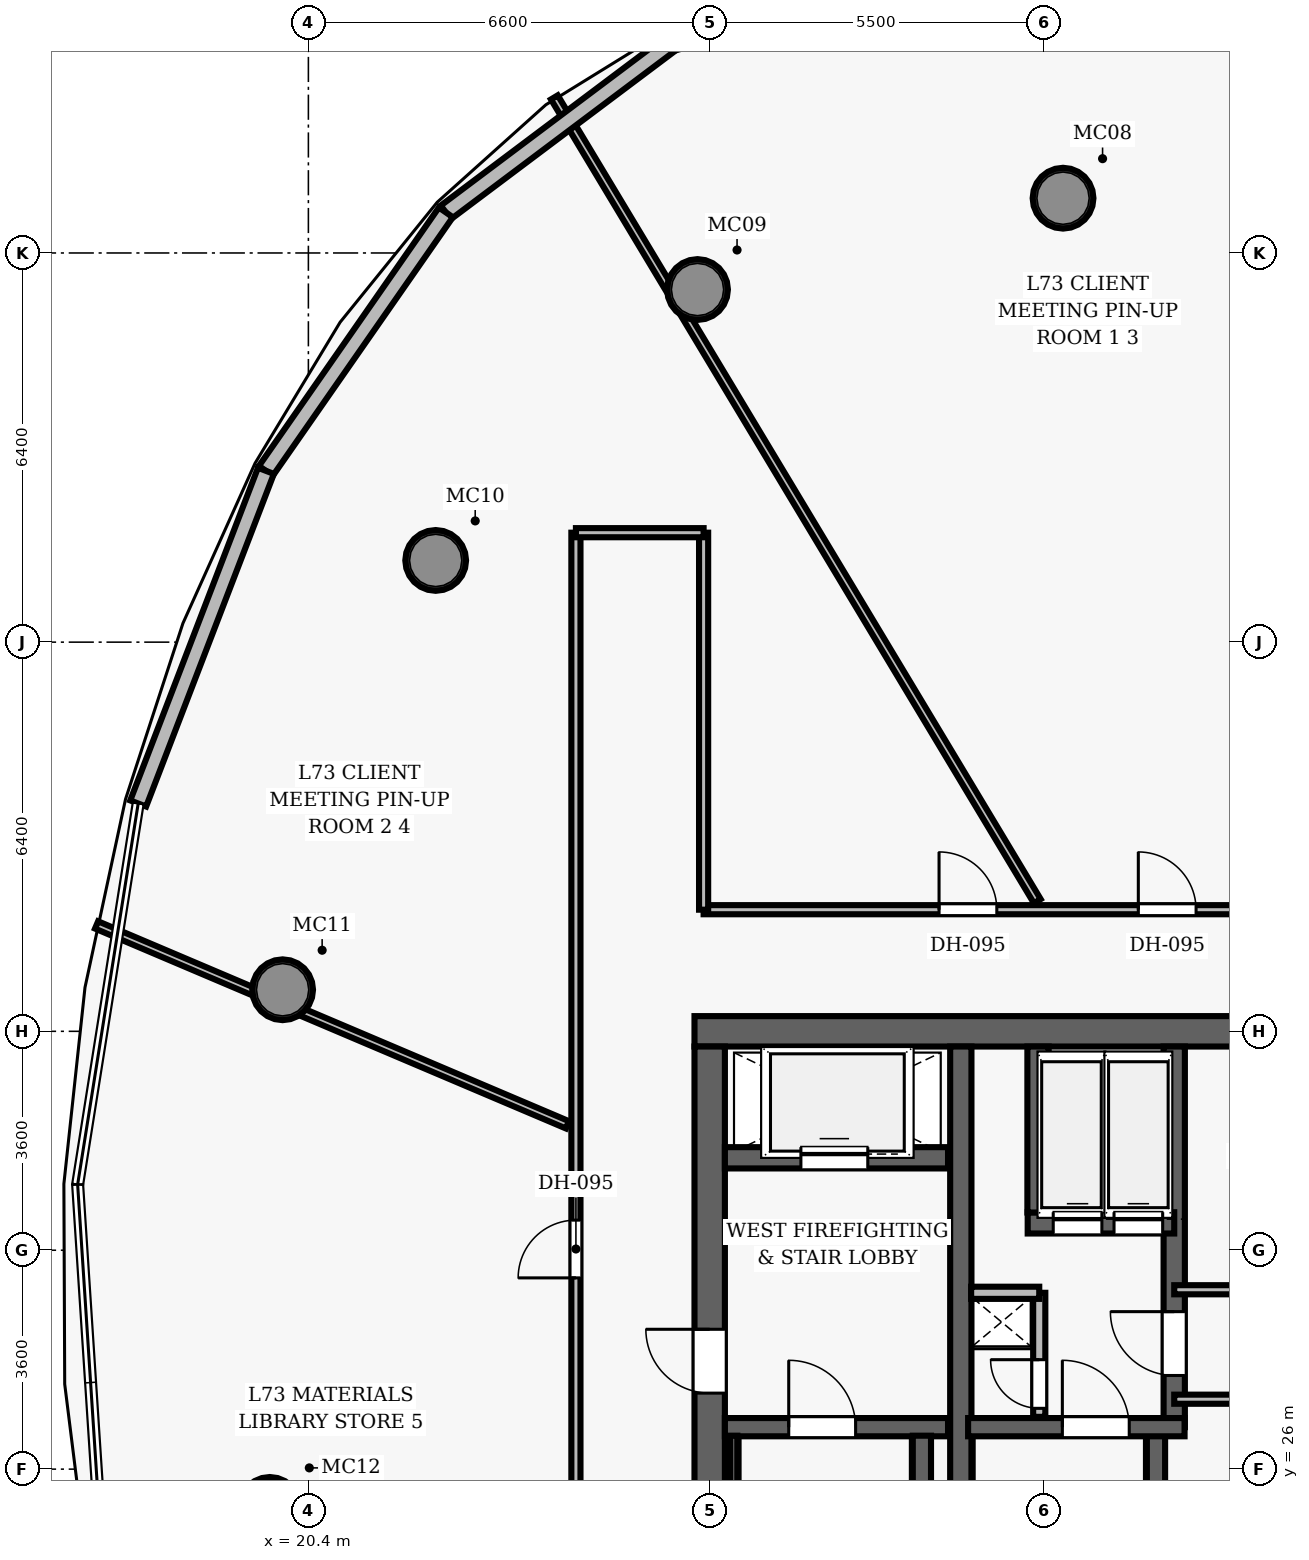
"""IFC4 building model, lengths in metres.
Left out: names, types, materials, properties, quantities, classifications, styles, units other than length and angle.
Written with IfcOpenShell. Run it as: python <this file> out.ifc"""

import sys

from ifc_helpers import new_model, si_unit, direction, frame, frame_2d, origin, origin_2d, place, context, subcontext, project, spatial, rectangle, hollow_circle, extrude, element, fill, save


model = new_model("IFC4")
c1 = context("Model", 3, precision=1e-05, world=origin(), true_north=direction((0.0, 1.0)))
c2 = subcontext(c1, "Body", "Model", "MODEL_VIEW")
j1 = project(units=[si_unit("LENGTHUNIT", "METRE"), si_unit("PLANEANGLEUNIT", "RADIAN")], contexts=[c1])
p1 = place(None, origin())
s1 = spatial("IfcSite", under=j1, at=p1, CompositionType="ELEMENT")
p2 = place(p1, origin())
s2 = spatial("IfcBuilding", under=s1, at=p2, CompositionType="ELEMENT")
p3 = place(p2, frame((0.0, 0.0, 288.25)))
s3 = spatial("IfcBuildingStorey", under=s2, at=p3, CompositionType="ELEMENT", Elevation=288.25)
p4 = place(p3, frame((26.75, 33.2, 0.0), z_axis=(0.0, 0.0, 1.0), x_axis=(1.0, 0.0, 0.0)))
e1 = element("IfcWall", 1, at=p4, inside=s3, PredefinedType="SHEAR", context=c2, shape_type="SweptSolid", body=[
    extrude(rectangle(XDim=22.5, YDim=0.5, at=frame_2d((11.25, 0.0))), origin(), (0.0, 0.0, 1.0), 3.85),
])
p5 = place(p3, frame((27.0, 19.05, 0.0), z_axis=(0.0, 0.0, 1.0), x_axis=(0.0, 1.0, 0.0)))
e2 = element("IfcWall", 2, at=p5, inside=s3, PredefinedType="SHEAR", context=c2, shape_type="SweptSolid", body=[
    extrude(rectangle(XDim=13.9, YDim=0.5, at=frame_2d((6.95, 0.0))), origin(), (0.0, 0.0, 1.0), 3.85),
])
p6 = place(p5, frame((8.2, 0.0, 0.0)))
e3 = element("IfcOpeningElement", 3, at=p6, cuts=e2, PredefinedType="OPENING", context=c2, shape_type="SweptSolid", body=[
    extrude(rectangle(XDim=1.05, YDim=2.15, at=frame_2d((0.525, 1.075))), frame((0.0, 0.26, 0.0), z_axis=(0.0, -1.0, 0.0), x_axis=(1.0, 0.0, 0.0)), (0.0, 0.0, 1.0), 0.52),
])
p7 = place(p3, frame((31.13, 19.05, 0.0), z_axis=(0.0, 0.0, 1.0), x_axis=(0.0, 1.0, 0.0)))
e4 = element("IfcWall", 4, at=p7, inside=s3, PredefinedType="SHEAR", context=c2, shape_type="SweptSolid", body=[
    extrude(rectangle(XDim=13.9, YDim=0.35, at=frame_2d((6.95, 0.0))), origin(), (0.0, 0.0, 1.0), 3.85),
])
for number, where, z_axis, x_axis in (
    (5, (32.812, 46.901, 0.0), (0.0, 0.0, 1.0), (1.0, 0.0, 0.0)),
    (6, (26.8, 45.399, 0.0), (0.0, 0.0, 1.0), (1.0, 0.0, 0.0)),
    (7, (22.494, 40.944, 0.0), (0.0, 0.0, 1.0), (1.0, 0.0, 0.0)),
    (8, (19.976, 33.884, 0.0), (0.0, 0.0, 1.0), (1.0, 0.0, 0.0)),
    (9, (19.765, 25.371, 0.0), (0.0, 0.0, 1.0), (1.0, 0.0, 0.0)),
):
    element("IfcColumn", number, at=place(p3, frame(where, z_axis=z_axis, x_axis=x_axis)), inside=s3, PredefinedType="COLUMN", context=c2, shape_type="SweptSolid", body=[
        extrude(hollow_circle(Radius=0.5, WallThickness=0.045, at=origin_2d()), origin(), (0.0, 0.0, 1.0), 3.85),
    ])
p8 = place(p3, frame((27.25, 26.69, 0.0), z_axis=(0.0, 0.0, 1.0), x_axis=(1.0, 0.0, 0.0)))
e10 = element("IfcWall", 10, at=p8, inside=s3, PredefinedType="SHEAR", context=c2, shape_type="SweptSolid", body=[
    extrude(rectangle(XDim=3.67, YDim=0.3, at=frame_2d((1.835, 0.0))), origin(), (0.0, 0.0, 1.0), 3.85),
])
p9 = place(p8, frame((1.05, 0.0, 0.0)))
e11 = element("IfcOpeningElement", 11, at=p9, cuts=e10, PredefinedType="OPENING", context=c2, shape_type="SweptSolid", body=[
    extrude(rectangle(XDim=1.1, YDim=2.15, at=frame_2d((0.55, 1.075))), frame((0.0, 0.16, 0.0), z_axis=(0.0, -1.0, 0.0), x_axis=(1.0, 0.0, 0.0)), (0.0, 0.0, 1.0), 0.32),
])
p10 = place(p3, frame((30.49, 19.05, 0.0), z_axis=(0.0, 0.0, 1.0), x_axis=(0.0, 1.0, 0.0)))
e12 = element("IfcWall", 12, at=p10, inside=s3, PredefinedType="SHEAR", context=c2, shape_type="SweptSolid", body=[
    extrude(rectangle(XDim=7.5, YDim=0.3, at=frame_2d((3.75, 0.0))), origin(), (0.0, 0.0, 1.0), 3.85),
])
p11 = place(p3, frame((27.395, 19.1, 0.0), z_axis=(0.0, 0.0, 1.0), x_axis=(0.0, 1.0, 0.0)))
e13 = element("IfcWall", 13, at=p11, inside=s3, PredefinedType="SHEAR", context=c2, shape_type="SweptSolid", body=[
    extrude(rectangle(XDim=7.45, YDim=0.12, at=frame_2d((3.725, 0.0))), origin(), (0.0, 0.0, 1.0), 3.85),
])
p12 = place(p3, frame((27.25, 31.12, 0.0), z_axis=(0.0, 0.0, 1.0), x_axis=(1.0, 0.0, 0.0)))
e14 = element("IfcWall", 14, at=p12, inside=s3, PredefinedType="SHEAR", context=c2, shape_type="SweptSolid", body=[
    extrude(rectangle(XDim=3.67, YDim=0.35, at=frame_2d((1.835, 0.0))), origin(), (0.0, 0.0, 1.0), 3.04),
])
p13 = place(p12, frame((1.25, 0.0, 0.0)))
e15 = element("IfcOpeningElement", 15, at=p13, cuts=e14, PredefinedType="OPENING", context=c2, shape_type="SweptSolid", body=[
    extrude(rectangle(XDim=1.1, YDim=2.15, at=frame_2d((0.55, 1.075))), frame((0.0, 0.185, 0.0), z_axis=(0.0, -1.0, 0.0), x_axis=(1.0, 0.0, 0.0)), (0.0, 0.0, 1.0), 0.37),
])
p14 = place(p3, frame((34.34, 19.05, 0.0), z_axis=(0.0, 0.0, 1.0), x_axis=(0.0, 1.0, 0.0)))
e16 = element("IfcWall", 16, at=p14, inside=s3, PredefinedType="SHEAR", context=c2, shape_type="SweptSolid", body=[
    extrude(rectangle(XDim=7.5, YDim=0.3, at=frame_2d((3.75, 0.0))), origin(), (0.0, 0.0, 1.0), 3.85),
])
p15 = place(p3, frame((34.64, 26.69, 0.0), z_axis=(0.0, 0.0, 1.0), x_axis=(0.0, 1.0, 0.0)))
e17 = element("IfcWall", 17, at=p15, inside=s3, PredefinedType="SHEAR", context=c2, shape_type="SweptSolid", body=[
    extrude(rectangle(XDim=6.26, YDim=0.35, at=frame_2d((3.13, 0.0))), origin(), (0.0, 0.0, 1.0), 3.85),
])
p16 = place(p15, frame((0.85, 0.0, 0.0)))
e18 = element("IfcOpeningElement", 18, at=p16, cuts=e17, PredefinedType="OPENING", context=c2, shape_type="SweptSolid", body=[
    extrude(rectangle(XDim=1.05, YDim=2.15, at=frame_2d((0.525, 1.075))), frame((0.0, 0.185, 0.0), z_axis=(0.0, -1.0, 0.0), x_axis=(1.0, 0.0, 0.0)), (0.0, 0.0, 1.0), 0.37),
])
p17 = place(p3, frame((31.25, 26.69, 0.0), z_axis=(0.0, 0.0, 1.0), x_axis=(1.0, 0.0, 0.0)))
e19 = element("IfcWall", 19, at=p17, inside=s3, PredefinedType="SHEAR", context=c2, shape_type="SweptSolid", body=[
    extrude(rectangle(XDim=3.56, YDim=0.3, at=frame_2d((1.78, 0.0))), origin(), (0.0, 0.0, 1.0), 3.85),
])
p18 = place(p17, frame((1.55, 0.0, 0.0)))
e20 = element("IfcOpeningElement", 20, at=p18, cuts=e19, PredefinedType="OPENING", context=c2, shape_type="SweptSolid", body=[
    extrude(rectangle(XDim=1.1, YDim=2.15, at=frame_2d((0.55, 1.075))), frame((0.0, 0.16, 0.0), z_axis=(0.0, -1.0, 0.0), x_axis=(1.0, 0.0, 0.0)), (0.0, 0.0, 1.0), 0.32),
])
p19 = place(p3, frame((32.23, 30.05, 0.0), z_axis=(0.0, 0.0, 1.0), x_axis=(1.0, 0.0, 0.0)))
e21 = element("IfcWall", 21, at=p19, inside=s3, PredefinedType="SHEAR", context=c2, shape_type="SweptSolid", body=[
    extrude(rectangle(XDim=2.41, YDim=0.35, at=frame_2d((1.205, 0.0))), origin(), (0.0, 0.0, 1.0), 3.04),
])
p20 = place(p19, frame((0.42, 0.0, 0.0)))
e22 = element("IfcOpeningElement", 22, at=p20, cuts=e21, PredefinedType="OPENING", context=c2, shape_type="SweptSolid", body=[
    extrude(rectangle(XDim=0.8, YDim=2.15, at=frame_2d((0.4, 1.075))), frame((0.0, 0.185, 0.0), z_axis=(0.0, -1.0, 0.0), x_axis=(1.0, 0.0, 0.0)), (0.0, 0.0, 1.0), 0.37),
])
p21 = place(p19, frame((1.42, 0.0, 0.0)))
e23 = element("IfcOpeningElement", 23, at=p21, cuts=e21, PredefinedType="OPENING", context=c2, shape_type="SweptSolid", body=[
    extrude(rectangle(XDim=0.8, YDim=2.15, at=frame_2d((0.4, 1.075))), frame((0.0, 0.185, 0.0), z_axis=(0.0, -1.0, 0.0), x_axis=(1.0, 0.0, 0.0)), (0.0, 0.0, 1.0), 0.37),
])
p22 = place(p3, frame((32.4, 30.22, 0.0), z_axis=(0.0, 0.0, 1.0), x_axis=(0.0, 1.0, 0.0)))
e24 = element("IfcWall", 24, at=p22, inside=s3, PredefinedType="SHEAR", context=c2, shape_type="SweptSolid", body=[
    extrude(rectangle(XDim=2.73, YDim=0.35, at=frame_2d((1.365, 0.0))), origin(), (0.0, 0.0, 1.0), 3.04),
])
p23 = place(p3, frame((32.42, 26.86, 0.0), z_axis=(0.0, 0.0, 1.0), x_axis=(0.0, 1.0, 0.0)))
e25 = element("IfcWall", 25, at=p23, inside=s3, PredefinedType="PARTITIONING", context=c2, shape_type="SweptSolid", body=[
    extrude(rectangle(XDim=2.04, YDim=0.2, at=frame_2d((1.02, 0.0))), origin(), (0.0, 0.0, 1.0), 3.04),
])
p24 = place(p23, frame((0.14, 0.0, 0.0)))
e26 = element("IfcOpeningElement", 26, at=p24, cuts=e25, PredefinedType="OPENING", context=c2, shape_type="SweptSolid", body=[
    extrude(rectangle(XDim=0.8, YDim=2.05, at=frame_2d((0.4, 1.025))), frame((0.0, 0.11, 0.0), z_axis=(0.0, -1.0, 0.0), x_axis=(1.0, 0.0, 0.0)), (0.0, 0.0, 1.0), 0.22),
])
p25 = place(p3, frame((31.3, 28.9, 0.0), z_axis=(0.0, 0.0, 1.0), x_axis=(1.0, 0.0, 0.0)))
e27 = element("IfcWall", 27, at=p25, inside=s3, PredefinedType="PARTITIONING", context=c2, shape_type="SweptSolid", body=[
    extrude(rectangle(XDim=1.12, YDim=0.2, at=frame_2d((0.56, 0.0))), origin(), (0.0, 0.0, 1.0), 3.04),
])
for number, where, z_axis, x_axis in (
    (28, (34.64, 27.15, 0.0), (0.0, 0.0, 1.0), (1.0, 0.0, 0.0)),
    (29, (34.64, 28.95, 0.0), (0.0, 0.0, 1.0), (1.0, 0.0, 0.0)),
):
    element("IfcWall", number, at=place(p3, frame(where, z_axis=z_axis, x_axis=x_axis)), inside=s3, PredefinedType="PARTITIONING", context=c2, shape_type="SweptSolid", body=[
        extrude(rectangle(XDim=6.36, YDim=0.15, at=frame_2d((3.18, 0.0))), origin(), (0.0, 0.0, 1.0), 3.04),
    ])
p26 = place(p3, frame((26.9, 35.2, 0.0), z_axis=(0.0, 0.0, 1.0), x_axis=(1.0, 0.0, 0.0)))
e30 = element("IfcWall", 30, at=p26, inside=s3, PredefinedType="PARTITIONING", context=c2, shape_type="SweptSolid", body=[
    extrude(rectangle(XDim=10.05, YDim=0.15, at=frame_2d((5.025, 0.0))), origin(), (0.0, 0.0, 1.0), 3.04),
])
p27 = place(p26, frame((7.149, 0.0, 0.0)))
e31 = element("IfcOpeningElement", 31, at=p27, cuts=e30, PredefinedType="OPENING", context=c2, shape_type="SweptSolid", body=[
    extrude(rectangle(XDim=0.95, YDim=2.15, at=frame_2d((0.475, 1.075))), frame((0.0, 0.085, 0.0), z_axis=(0.0, -1.0, 0.0), x_axis=(1.0, 0.0, 0.0)), (0.0, 0.0, 1.0), 0.17),
])
p28 = place(p26, frame((3.872, 0.0, 0.0)))
e32 = element("IfcOpeningElement", 32, at=p28, cuts=e30, PredefinedType="OPENING", context=c2, shape_type="SweptSolid", body=[
    extrude(rectangle(XDim=0.95, YDim=2.15, at=frame_2d((0.475, 1.075))), frame((0.0, 0.085, 0.0), z_axis=(0.0, -1.0, 0.0), x_axis=(1.0, 0.0, 0.0)), (0.0, 0.0, 1.0), 0.17),
])
p29 = place(p3, frame((24.8, 11.23, 0.0), z_axis=(0.0, 0.0, 1.0), x_axis=(0.0, 1.0, 0.0)))
e33 = element("IfcWall", 33, at=p29, inside=s3, PredefinedType="PARTITIONING", context=c2, shape_type="SweptSolid", body=[
    extrude(rectangle(XDim=30.17, YDim=0.15, at=frame_2d((15.085, 0.0))), origin(), (0.0, 0.0, 1.0), 3.04),
])
p30 = place(p29, frame((17.915, 0.0, 0.0)))
e34 = element("IfcOpeningElement", 34, at=p30, cuts=e33, PredefinedType="OPENING", context=c2, shape_type="SweptSolid", body=[
    extrude(rectangle(XDim=0.95, YDim=2.15, at=frame_2d((0.475, 1.075))), frame((0.0, 0.085, 0.0), z_axis=(0.0, -1.0, 0.0), x_axis=(1.0, 0.0, 0.0)), (0.0, 0.0, 1.0), 0.17),
])
p31 = place(p29, frame((8.518, 0.0, 0.0)))
e35 = element("IfcOpeningElement", 35, at=p31, cuts=e33, PredefinedType="OPENING", context=c2, shape_type="SweptSolid", body=[
    extrude(rectangle(XDim=0.95, YDim=2.15, at=frame_2d((0.475, 1.075))), frame((0.0, 0.085, 0.0), z_axis=(0.0, -1.0, 0.0), x_axis=(1.0, 0.0, 0.0)), (0.0, 0.0, 1.0), 0.17),
])
p32 = place(p3, frame((26.9, 35.2, 0.0), z_axis=(0.0, 0.0, 1.0), x_axis=(0.0, 1.0, 0.0)))
e36 = element("IfcWall", 36, at=p32, inside=s3, PredefinedType="PARTITIONING", context=c2, shape_type="SweptSolid", body=[
    extrude(rectangle(XDim=6.2, YDim=0.15, at=frame_2d((3.1, 0.0))), origin(), (0.0, 0.0, 1.0), 3.04),
])
p33 = place(p3, frame((24.8, 41.4, 0.0), z_axis=(0.0, 0.0, 1.0), x_axis=(1.0, 0.0, 0.0)))
e37 = element("IfcWall", 37, at=p33, inside=s3, PredefinedType="PARTITIONING", context=c2, shape_type="SweptSolid", body=[
    extrude(rectangle(XDim=2.1, YDim=0.15, at=frame_2d((1.05, 0.0))), origin(), (0.0, 0.0, 1.0), 3.04),
])
p34 = place(p3, frame((32.388, 35.34, 0.0), z_axis=(0.0, 0.0, 1.0), x_axis=(-0.515038105657, 0.857167282227, 0.0)))
e38 = element("IfcWall", 38, at=p34, inside=s3, PredefinedType="PARTITIONING", context=c2, shape_type="SweptSolid", body=[
    extrude(rectangle(XDim=15.421, YDim=0.13, at=frame_2d((7.711, 0.0))), origin(), (0.0, 0.0, 1.0), 3.04),
])
p35 = place(p3, frame((24.66, 31.663, 0.0), z_axis=(0.0, 0.0, 1.0), x_axis=(-0.920505560615, 0.390729462514, 0.0)))
e39 = element("IfcWall", 39, at=p35, inside=s3, PredefinedType="PARTITIONING", context=c2, shape_type="SweptSolid", body=[
    extrude(rectangle(XDim=8.412, YDim=0.13, at=frame_2d((4.206, 0.0))), origin(), (0.0, 0.0, 1.0), 3.04),
])
p36 = place(p3, frame((22.661, 46.668, 0.0), z_axis=(0.0, 0.0, 1.0), x_axis=(0.799710133829, 0.600386293856, 0.0)))
e40 = element("IfcWall", 40, at=p36, inside=s3, PredefinedType="SOLIDWALL", context=c2, shape_type="SweptSolid", body=[
    extrude(rectangle(XDim=4.651, YDim=0.28, at=frame_2d((2.325, 0.0))), origin(), (0.0, 0.0, 1.0), 3.625),
])
p37 = place(p3, frame((19.701, 42.417, 0.0), z_axis=(0.0, 0.0, 1.0), x_axis=(0.571372443158, 0.820690886509, 0.0)))
e41 = element("IfcWall", 41, at=p37, inside=s3, PredefinedType="SOLIDWALL", context=c2, shape_type="SweptSolid", body=[
    extrude(rectangle(XDim=5.179, YDim=0.28, at=frame_2d((2.59, 0.0))), origin(), (0.0, 0.0, 1.0), 3.625),
])
p38 = place(p3, frame((17.601, 36.947, 0.0), z_axis=(0.0, 0.0, 1.0), x_axis=(0.358468117359, 0.93354196951, 0.0)))
e42 = element("IfcWall", 42, at=p38, inside=s3, PredefinedType="SOLIDWALL", context=c2, shape_type="SweptSolid", body=[
    extrude(rectangle(XDim=5.86, YDim=0.28, at=frame_2d((2.93, 0.0))), origin(), (0.0, 0.0, 1.0), 3.625),
])
p39 = place(p9, origin())
e43 = element("IfcDoor", 43, at=p39, inside=s3, OperationType="SINGLE_SWING_LEFT", PredefinedType="DOOR", context=c2, shape_type="SweptSolid", body=[
    extrude(rectangle(XDim=1.1, YDim=2.15, at=frame_2d((0.55, 1.075))), frame((0.0, 0.025, 0.0), z_axis=(0.0, -1.0, 0.0), x_axis=(1.0, 0.0, 0.0)), (0.0, 0.0, 1.0), 0.05),
])
fill(e11, e43)
p40 = place(p6, origin())
e44 = element("IfcDoor", 44, at=p40, inside=s3, OperationType="SINGLE_SWING_RIGHT", PredefinedType="DOOR", context=c2, shape_type="SweptSolid", body=[
    extrude(rectangle(XDim=1.05, YDim=2.15, at=frame_2d((0.525, 1.075))), frame((0.0, 0.025, 0.0), z_axis=(0.0, -1.0, 0.0), x_axis=(1.0, 0.0, 0.0)), (0.0, 0.0, 1.0), 0.05),
])
fill(e3, e44)
p41 = place(p18, origin())
e45 = element("IfcDoor", 45, at=p41, inside=s3, OperationType="SINGLE_SWING_LEFT", PredefinedType="DOOR", context=c2, shape_type="SweptSolid", body=[
    extrude(rectangle(XDim=1.1, YDim=2.15, at=frame_2d((0.55, 1.075))), frame((0.0, 0.025, 0.0), z_axis=(0.0, -1.0, 0.0), x_axis=(1.0, 0.0, 0.0)), (0.0, 0.0, 1.0), 0.05),
])
fill(e20, e45)
p42 = place(p24, origin())
e46 = element("IfcDoor", 46, at=p42, inside=s3, OperationType="SINGLE_SWING_RIGHT", PredefinedType="DOOR", context=c2, shape_type="SweptSolid", body=[
    extrude(rectangle(XDim=0.8, YDim=2.05, at=frame_2d((0.4, 1.025))), frame((0.0, 0.025, 0.0), z_axis=(0.0, -1.0, 0.0), x_axis=(1.0, 0.0, 0.0)), (0.0, 0.0, 1.0), 0.05),
])
fill(e26, e46)
p43 = place(p16, origin())
e47 = element("IfcDoor", 47, at=p43, inside=s3, OperationType="SINGLE_SWING_RIGHT", PredefinedType="DOOR", context=c2, shape_type="SweptSolid", body=[
    extrude(rectangle(XDim=1.05, YDim=2.15, at=frame_2d((0.525, 1.075))), frame((0.0, 0.025, 0.0), z_axis=(0.0, -1.0, 0.0), x_axis=(1.0, 0.0, 0.0)), (0.0, 0.0, 1.0), 0.05),
])
fill(e18, e47)
p44 = place(p27, origin())
e48 = element("IfcDoor", 48, at=p44, inside=s3, OperationType="SINGLE_SWING_LEFT", PredefinedType="DOOR", context=c2, shape_type="SweptSolid", body=[
    extrude(rectangle(XDim=0.95, YDim=2.15, at=frame_2d((0.475, 1.075))), frame((0.0, 0.025, 0.0), z_axis=(0.0, -1.0, 0.0), x_axis=(1.0, 0.0, 0.0)), (0.0, 0.0, 1.0), 0.05),
])
fill(e31, e48)
p45 = place(p28, origin())
e49 = element("IfcDoor", 49, at=p45, inside=s3, OperationType="SINGLE_SWING_LEFT", PredefinedType="DOOR", context=c2, shape_type="SweptSolid", body=[
    extrude(rectangle(XDim=0.95, YDim=2.15, at=frame_2d((0.475, 1.075))), frame((0.0, 0.025, 0.0), z_axis=(0.0, -1.0, 0.0), x_axis=(1.0, 0.0, 0.0)), (0.0, 0.0, 1.0), 0.05),
])
fill(e32, e49)
p46 = place(p30, origin())
e50 = element("IfcDoor", 50, at=p46, inside=s3, OperationType="SINGLE_SWING_LEFT", PredefinedType="DOOR", context=c2, shape_type="SweptSolid", body=[
    extrude(rectangle(XDim=0.95, YDim=2.15, at=frame_2d((0.475, 1.075))), frame((0.0, 0.025, 0.0), z_axis=(0.0, -1.0, 0.0), x_axis=(1.0, 0.0, 0.0)), (0.0, 0.0, 1.0), 0.05),
])
fill(e34, e50)
p47 = place(p13, origin())
e51 = element("IfcDoor", 51, at=p47, inside=s3, OperationType="SLIDING_TO_LEFT", PredefinedType="DOOR", context=c2, shape_type="SweptSolid", body=[
    extrude(rectangle(XDim=1.1, YDim=2.15, at=frame_2d((0.55, 1.075))), frame((0.0, 0.025, 0.0), z_axis=(0.0, -1.0, 0.0), x_axis=(1.0, 0.0, 0.0)), (0.0, 0.0, 1.0), 0.05),
])
fill(e15, e51)
p48 = place(p20, origin())
e52 = element("IfcDoor", 52, at=p48, inside=s3, OperationType="SLIDING_TO_LEFT", PredefinedType="DOOR", context=c2, shape_type="SweptSolid", body=[
    extrude(rectangle(XDim=0.8, YDim=2.15, at=frame_2d((0.4, 1.075))), frame((0.0, 0.025, 0.0), z_axis=(0.0, -1.0, 0.0), x_axis=(1.0, 0.0, 0.0)), (0.0, 0.0, 1.0), 0.05),
])
fill(e22, e52)
p49 = place(p21, origin())
e53 = element("IfcDoor", 53, at=p49, inside=s3, OperationType="SLIDING_TO_LEFT", PredefinedType="DOOR", context=c2, shape_type="SweptSolid", body=[
    extrude(rectangle(XDim=0.8, YDim=2.15, at=frame_2d((0.4, 1.075))), frame((0.0, 0.025, 0.0), z_axis=(0.0, -1.0, 0.0), x_axis=(1.0, 0.0, 0.0)), (0.0, 0.0, 1.0), 0.05),
])
fill(e23, e53)
save(model, sys.argv[1])
